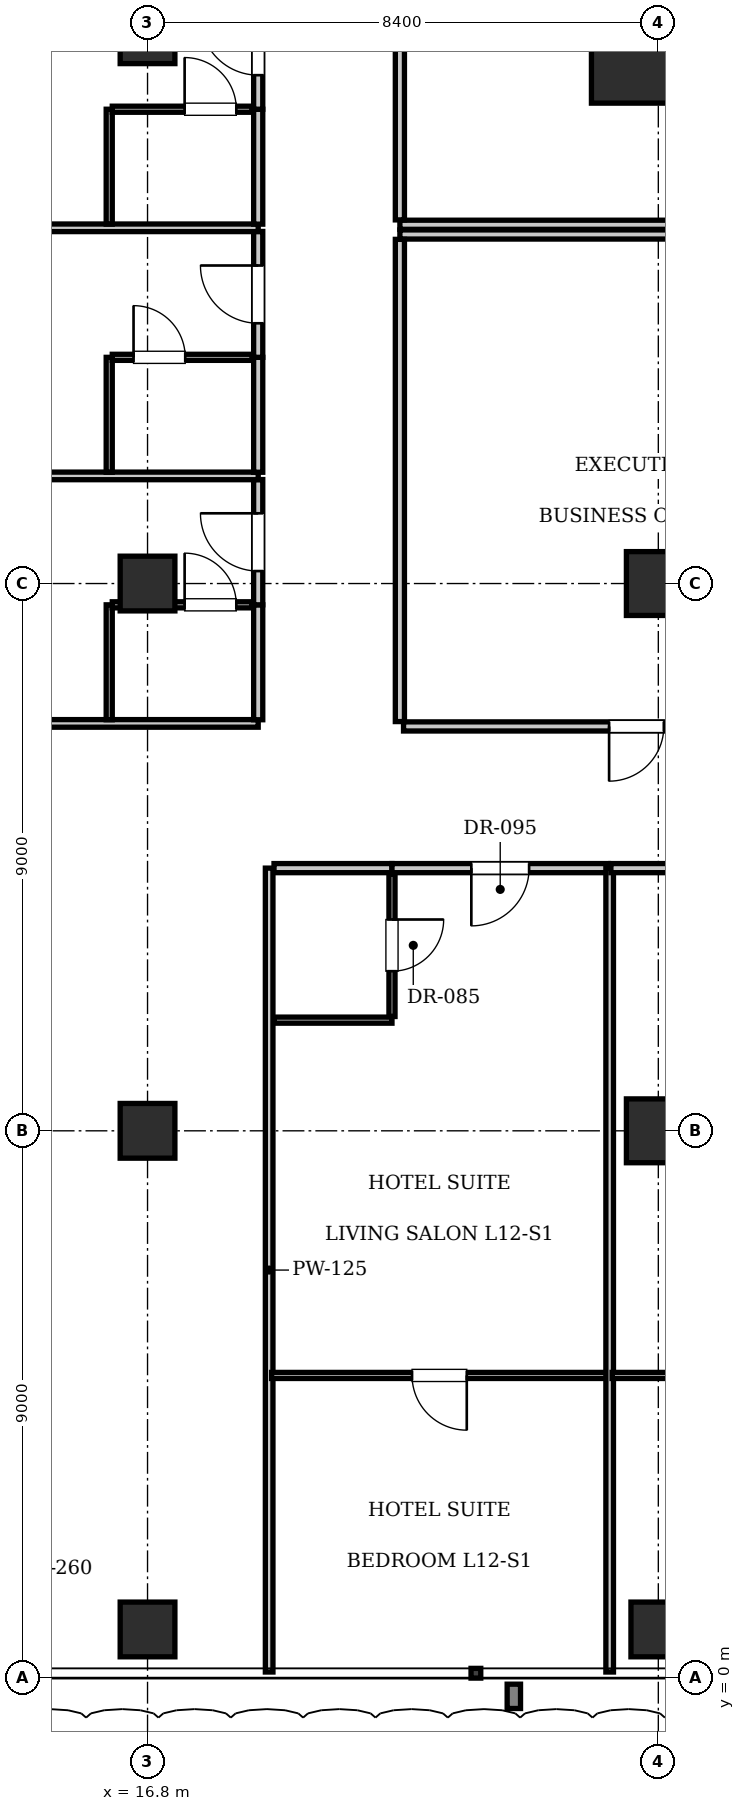
"""IFC4 building model, lengths in metres.
Left out: names, types, materials, properties, quantities, classifications, styles, units other than length and angle.
Written with IfcOpenShell. Run it as: python <this file> out.ifc"""

import sys

from ifc_helpers import new_model, si_unit, direction, frame, frame_2d, origin, origin_2d, place, context, subcontext, project, spatial, rectangle, extrude, element, fill, save


model = new_model("IFC4")
c1 = context("Model", 3, precision=1e-05, world=origin(), true_north=direction((0.0, 1.0)))
c2 = subcontext(c1, "Body", "Model", "MODEL_VIEW")
j1 = project(units=[si_unit("LENGTHUNIT", "METRE"), si_unit("PLANEANGLEUNIT", "RADIAN")], contexts=[c1])
p1 = place(None, origin())
s1 = spatial("IfcSite", under=j1, at=p1, CompositionType="ELEMENT")
p2 = place(p1, origin())
s2 = spatial("IfcBuilding", under=s1, at=p2, CompositionType="ELEMENT")
p3 = place(p2, frame((0.0, 0.0, 53.9)))
s3 = spatial("IfcBuildingStorey", under=s2, at=p3, CompositionType="ELEMENT", Elevation=53.9)
p4 = place(p3, frame((25.2, 27.0, 0.0), z_axis=(0.0, 0.0, 1.0), x_axis=(1.0, 0.0, 0.0)))
e1 = element("IfcColumn", 1, at=p4, inside=s3, PredefinedType="COLUMN", context=c2, shape_type="SweptSolid", body=[
    extrude(rectangle(XDim=2.2, YDim=2.2, at=origin_2d()), origin(), (0.0, 0.0, 1.0), 3.85),
])
for number, where, z_axis, x_axis in (
    (2, (25.2, 18.0, 0.0), (0.0, 0.0, 1.0), (1.0, 0.0, 0.0)),
    (3, (25.2, 9.0, 0.0), (0.0, 0.0, 1.0), (1.0, 0.0, 0.0)),
):
    element("IfcColumn", number, at=place(p3, frame(where, z_axis=z_axis, x_axis=x_axis)), inside=s3, PredefinedType="COLUMN", context=c2, shape_type="SweptSolid", body=[
        extrude(rectangle(XDim=1.05, YDim=1.05, at=origin_2d()), origin(), (0.0, 0.0, 1.0), 3.85),
    ])
for number, where, z_axis, x_axis in (
    (4, (16.8, 9.0, 0.0), (0.0, 0.0, 1.0), (1.0, 0.0, 0.0)),
    (5, (16.8, 18.0, 0.0), (0.0, 0.0, 1.0), (1.0, 0.0, 0.0)),
    (6, (16.8, 27.0, 0.0), (0.0, 0.0, 1.0), (1.0, 0.0, 0.0)),
    (7, (16.8, 0.8, 0.0), (0.0, 0.0, 1.0), (1.0, 0.0, 0.0)),
    (8, (25.2, 0.8, 0.0), (0.0, 0.0, 1.0), (1.0, 0.0, 0.0)),
):
    element("IfcColumn", number, at=place(p3, frame(where, z_axis=z_axis, x_axis=x_axis)), inside=s3, PredefinedType="COLUMN", context=c2, shape_type="SweptSolid", body=[
        extrude(rectangle(XDim=0.9, YDim=0.9, at=origin_2d()), origin(), (0.0, 0.0, 1.0), 3.85),
    ])
p5 = place(p3, frame((20.95, 23.9, 0.0), z_axis=(0.0, 0.0, 1.0), x_axis=(1.0, 0.0, 0.0)))
e9 = element("IfcWall", 9, at=p5, inside=s3, PredefinedType="PARTITIONING", context=c2, shape_type="SweptSolid", body=[
    extrude(rectangle(XDim=33.7, YDim=0.15, at=frame_2d((16.85, 0.0))), origin(), (0.0, 0.0, 1.0), 3.61),
])
p6 = place(p3, frame((20.95, 23.98, 0.0), z_axis=(0.0, 0.0, 1.0), x_axis=(0.0, 1.0, 0.0)))
e10 = element("IfcWall", 10, at=p6, inside=s3, PredefinedType="PARTITIONING", context=c2, shape_type="SweptSolid", body=[
    extrude(rectangle(XDim=7.94, YDim=0.15, at=frame_2d((3.97, 0.0))), origin(), (0.0, 0.0, 1.0), 3.207),
])
p7 = place(p3, frame((20.95, 23.74, 0.0), z_axis=(0.0, 0.0, 1.0), x_axis=(1.0, 0.0, 0.0)))
e11 = element("IfcWall", 11, at=p7, inside=s3, PredefinedType="PARTITIONING", context=c2, shape_type="SweptSolid", body=[
    extrude(rectangle(XDim=33.7, YDim=0.15, at=frame_2d((16.85, 0.0))), origin(), (0.0, 0.0, 1.0), 3.61),
])
p8 = place(p3, frame((20.95, 15.73, 0.0), z_axis=(0.0, 0.0, 1.0), x_axis=(0.0, 1.0, 0.0)))
e12 = element("IfcWall", 12, at=p8, inside=s3, PredefinedType="PARTITIONING", context=c2, shape_type="SweptSolid", body=[
    extrude(rectangle(XDim=7.93, YDim=0.15, at=frame_2d((3.965, 0.0))), origin(), (0.0, 0.0, 1.0), 3.207),
])
p9 = place(p3, frame((21.01, 15.65, 0.0), z_axis=(0.0, 0.0, 1.0), x_axis=(1.0, 0.0, 0.0)))
e13 = element("IfcWall", 13, at=p9, inside=s3, PredefinedType="PARTITIONING", context=c2, shape_type="SweptSolid", body=[
    extrude(rectangle(XDim=7.661, YDim=0.15, at=frame_2d((3.831, 0.0))), origin(), (0.0, 0.0, 1.0), 3.61),
])
p10 = place(p9, frame((3.381, 0.0, 0.0)))
e14 = element("IfcOpeningElement", 14, at=p10, cuts=e13, PredefinedType="OPENING", context=c2, shape_type="SweptSolid", body=[
    extrude(rectangle(XDim=0.9, YDim=2.1, at=frame_2d((0.45, 1.05))), frame((0.0, 0.085, 0.0), z_axis=(0.0, -1.0, 0.0), x_axis=(1.0, 0.0, 0.0)), (0.0, 0.0, 1.0), 0.17),
])
p11 = place(p3, frame((18.8, 0.1, 0.0), z_axis=(0.0, 0.0, 1.0), x_axis=(0.0, 1.0, 0.0)))
e15 = element("IfcWall", 15, at=p11, inside=s3, PredefinedType="PARTITIONING", context=c2, shape_type="SweptSolid", body=[
    extrude(rectangle(XDim=13.22, YDim=0.125, at=frame_2d((6.61, 0.0))), origin(), (0.0, 0.0, 1.0), 3.61),
])
p12 = place(p3, frame((18.88, 13.32, 0.0), z_axis=(0.0, 0.0, 1.0), x_axis=(1.0, 0.0, 0.0)))
e16 = element("IfcWall", 16, at=p12, inside=s3, PredefinedType="PARTITIONING", context=c2, shape_type="SweptSolid", body=[
    extrude(rectangle(XDim=1.94, YDim=0.15, at=frame_2d((0.97, 0.0))), origin(), (0.0, 0.0, 1.0), 3.61),
])
p13 = place(p3, frame((18.88, 10.82, 0.0), z_axis=(0.0, 0.0, 1.0), x_axis=(1.0, 0.0, 0.0)))
e17 = element("IfcWall", 17, at=p13, inside=s3, PredefinedType="PARTITIONING", context=c2, shape_type="SweptSolid", body=[
    extrude(rectangle(XDim=1.94, YDim=0.1, at=frame_2d((0.97, 0.0))), origin(), (0.0, 0.0, 1.0), 3.61),
])
p14 = place(p3, frame((20.82, 10.88, 0.0), z_axis=(0.0, 0.0, 1.0), x_axis=(0.0, 1.0, 0.0)))
e18 = element("IfcWall", 18, at=p14, inside=s3, PredefinedType="PARTITIONING", context=c2, shape_type="SweptSolid", body=[
    extrude(rectangle(XDim=2.34, YDim=0.1, at=frame_2d((1.17, 0.0))), origin(), (0.0, 0.0, 1.0), 3.61),
])
p15 = place(p14, frame((0.745, 0.0, 0.0)))
e19 = element("IfcOpeningElement", 19, at=p15, cuts=e18, PredefinedType="OPENING", context=c2, shape_type="SweptSolid", body=[
    extrude(rectangle(XDim=0.85, YDim=2.1, at=frame_2d((0.425, 1.05))), frame((0.0, 0.06, 0.0), z_axis=(0.0, -1.0, 0.0), x_axis=(1.0, 0.0, 0.0)), (0.0, 0.0, 1.0), 0.12),
])
p16 = place(p3, frame((20.82, 13.32, 0.0), z_axis=(0.0, 0.0, 1.0), x_axis=(1.0, 0.0, 0.0)))
e20 = element("IfcWall", 20, at=p16, inside=s3, PredefinedType="PARTITIONING", context=c2, shape_type="SweptSolid", body=[
    extrude(rectangle(XDim=3.56, YDim=0.15, at=frame_2d((1.78, 0.0))), origin(), (0.0, 0.0, 1.0), 3.61),
])
p17 = place(p16, frame((1.305, 0.0, 0.0)))
e21 = element("IfcOpeningElement", 21, at=p17, cuts=e20, PredefinedType="OPENING", context=c2, shape_type="SweptSolid", body=[
    extrude(rectangle(XDim=0.95, YDim=2.15, at=frame_2d((0.475, 1.075))), frame((0.0, 0.085, 0.0), z_axis=(0.0, -1.0, 0.0), x_axis=(1.0, 0.0, 0.0)), (0.0, 0.0, 1.0), 0.17),
])
p18 = place(p3, frame((18.84, 4.977, 0.0), z_axis=(0.0, 0.0, 1.0), x_axis=(1.0, 0.0, 0.0)))
e22 = element("IfcWall", 22, at=p18, inside=s3, PredefinedType="PARTITIONING", context=c2, shape_type="SweptSolid", body=[
    extrude(rectangle(XDim=5.52, YDim=0.1, at=frame_2d((2.76, 0.0))), origin(), (0.0, 0.0, 1.0), 3.61),
])
p19 = place(p18, frame((2.31, 0.0, 0.0)))
e23 = element("IfcOpeningElement", 23, at=p19, cuts=e22, PredefinedType="OPENING", context=c2, shape_type="SweptSolid", body=[
    extrude(rectangle(XDim=0.9, YDim=2.1, at=frame_2d((0.45, 1.05))), frame((0.0, 0.06, 0.0), z_axis=(0.0, -1.0, 0.0), x_axis=(1.0, 0.0, 0.0)), (0.0, 0.0, 1.0), 0.12),
])
p20 = place(p3, frame((24.4, 0.1, 0.0), z_axis=(0.0, 0.0, 1.0), x_axis=(0.0, 1.0, 0.0)))
e24 = element("IfcWall", 24, at=p20, inside=s3, PredefinedType="PARTITIONING", context=c2, shape_type="SweptSolid", body=[
    extrude(rectangle(XDim=13.22, YDim=0.125, at=frame_2d((6.61, 0.0))), origin(), (0.0, 0.0, 1.0), 3.61),
])
p21 = place(p3, frame((24.42, 13.32, 0.0), z_axis=(0.0, 0.0, 1.0), x_axis=(1.0, 0.0, 0.0)))
e25 = element("IfcWall", 25, at=p21, inside=s3, PredefinedType="PARTITIONING", context=c2, shape_type="SweptSolid", body=[
    extrude(rectangle(XDim=3.56, YDim=0.15, at=frame_2d((1.78, 0.0))), origin(), (0.0, 0.0, 1.0), 3.61),
])
p22 = place(p21, frame((1.305, 0.0, 0.0)))
e26 = element("IfcOpeningElement", 26, at=p22, cuts=e25, PredefinedType="OPENING", context=c2, shape_type="SweptSolid", body=[
    extrude(rectangle(XDim=0.95, YDim=2.15, at=frame_2d((0.475, 1.075))), frame((0.0, 0.085, 0.0), z_axis=(0.0, -1.0, 0.0), x_axis=(1.0, 0.0, 0.0)), (0.0, 0.0, 1.0), 0.17),
])
p23 = place(p3, frame((24.44, 4.977, 0.0), z_axis=(0.0, 0.0, 1.0), x_axis=(1.0, 0.0, 0.0)))
e27 = element("IfcWall", 27, at=p23, inside=s3, PredefinedType="PARTITIONING", context=c2, shape_type="SweptSolid", body=[
    extrude(rectangle(XDim=5.52, YDim=0.1, at=frame_2d((2.76, 0.0))), origin(), (0.0, 0.0, 1.0), 3.61),
])
p24 = place(p23, frame((2.31, 0.0, 0.0)))
e28 = element("IfcOpeningElement", 28, at=p24, cuts=e27, PredefinedType="OPENING", context=c2, shape_type="SweptSolid", body=[
    extrude(rectangle(XDim=0.9, YDim=2.1, at=frame_2d((0.45, 1.05))), frame((0.0, 0.06, 0.0), z_axis=(0.0, -1.0, 0.0), x_axis=(1.0, 0.0, 0.0)), (0.0, 0.0, 1.0), 0.12),
])
p25 = place(p3, frame((10.9, 15.7, 0.0), z_axis=(0.0, 0.0, 1.0), x_axis=(1.0, 0.0, 0.0)))
e29 = element("IfcWall", 29, at=p25, inside=s3, PredefinedType="PARTITIONING", context=c2, shape_type="SweptSolid", body=[
    extrude(rectangle(XDim=7.72, YDim=0.125, at=frame_2d((3.86, 0.0))), origin(), (0.0, 0.0, 1.0), 3.61),
])
p26 = place(p3, frame((18.62, 15.76, 0.0), z_axis=(0.0, 0.0, 1.0), x_axis=(0.0, 1.0, 0.0)))
e30 = element("IfcWall", 30, at=p26, inside=s3, PredefinedType="PARTITIONING", context=c2, shape_type="SweptSolid", body=[
    extrude(rectangle(XDim=1.89, YDim=0.15, at=frame_2d((0.945, 0.0))), origin(), (0.0, 0.0, 1.0), 3.61),
])
p27 = place(p3, frame((18.62, 17.65, 0.0), z_axis=(0.0, 0.0, 1.0), x_axis=(0.0, 1.0, 0.0)))
e31 = element("IfcWall", 31, at=p27, inside=s3, PredefinedType="PARTITIONING", context=c2, shape_type="SweptSolid", body=[
    extrude(rectangle(XDim=2.06, YDim=0.15, at=frame_2d((1.03, 0.0))), origin(), (0.0, 0.0, 1.0), 3.61),
])
p28 = place(p27, frame((0.555, 0.0, 0.0)))
e32 = element("IfcOpeningElement", 32, at=p28, cuts=e31, PredefinedType="OPENING", context=c2, shape_type="SweptSolid", body=[
    extrude(rectangle(XDim=0.95, YDim=2.15, at=frame_2d((0.475, 1.075))), frame((0.0, 0.085, 0.0), z_axis=(0.0, -1.0, 0.0), x_axis=(1.0, 0.0, 0.0)), (0.0, 0.0, 1.0), 0.17),
])
p29 = place(p3, frame((16.17, 15.76, 0.0), z_axis=(0.0, 0.0, 1.0), x_axis=(0.0, 1.0, 0.0)))
e33 = element("IfcWall", 33, at=p29, inside=s3, PredefinedType="PARTITIONING", context=c2, shape_type="SweptSolid", body=[
    extrude(rectangle(XDim=1.89, YDim=0.1, at=frame_2d((0.945, 0.0))), origin(), (0.0, 0.0, 1.0), 3.61),
])
p30 = place(p3, frame((16.22, 17.65, 0.0), z_axis=(0.0, 0.0, 1.0), x_axis=(1.0, 0.0, 0.0)))
e34 = element("IfcWall", 34, at=p30, inside=s3, PredefinedType="PARTITIONING", context=c2, shape_type="SweptSolid", body=[
    extrude(rectangle(XDim=2.3, YDim=0.1, at=frame_2d((1.15, 0.0))), origin(), (0.0, 0.0, 1.0), 3.61),
])
p31 = place(p30, frame((1.19, 0.0, 0.0)))
e35 = element("IfcOpeningElement", 35, at=p31, cuts=e34, PredefinedType="OPENING", context=c2, shape_type="SweptSolid", body=[
    extrude(rectangle(XDim=0.85, YDim=2.1, at=frame_2d((0.425, 1.05))), frame((0.0, 0.06, 0.0), z_axis=(0.0, -1.0, 0.0), x_axis=(1.0, 0.0, 0.0)), (0.0, 0.0, 1.0), 0.12),
])
p32 = place(p3, frame((10.9, 19.77, 0.0), z_axis=(0.0, 0.0, 1.0), x_axis=(1.0, 0.0, 0.0)))
e36 = element("IfcWall", 36, at=p32, inside=s3, PredefinedType="PARTITIONING", context=c2, shape_type="SweptSolid", body=[
    extrude(rectangle(XDim=7.72, YDim=0.125, at=frame_2d((3.86, 0.0))), origin(), (0.0, 0.0, 1.0), 3.61),
])
p33 = place(p3, frame((18.62, 19.83, 0.0), z_axis=(0.0, 0.0, 1.0), x_axis=(0.0, 1.0, 0.0)))
e37 = element("IfcWall", 37, at=p33, inside=s3, PredefinedType="PARTITIONING", context=c2, shape_type="SweptSolid", body=[
    extrude(rectangle(XDim=1.89, YDim=0.15, at=frame_2d((0.945, 0.0))), origin(), (0.0, 0.0, 1.0), 3.61),
])
p34 = place(p3, frame((18.62, 21.72, 0.0), z_axis=(0.0, 0.0, 1.0), x_axis=(0.0, 1.0, 0.0)))
e38 = element("IfcWall", 38, at=p34, inside=s3, PredefinedType="PARTITIONING", context=c2, shape_type="SweptSolid", body=[
    extrude(rectangle(XDim=2.07, YDim=0.15, at=frame_2d((1.035, 0.0))), origin(), (0.0, 0.0, 1.0), 3.61),
])
p35 = place(p34, frame((0.56, 0.0, 0.0)))
e39 = element("IfcOpeningElement", 39, at=p35, cuts=e38, PredefinedType="OPENING", context=c2, shape_type="SweptSolid", body=[
    extrude(rectangle(XDim=0.95, YDim=2.15, at=frame_2d((0.475, 1.075))), frame((0.0, 0.085, 0.0), z_axis=(0.0, -1.0, 0.0), x_axis=(1.0, 0.0, 0.0)), (0.0, 0.0, 1.0), 0.17),
])
p36 = place(p3, frame((16.17, 19.83, 0.0), z_axis=(0.0, 0.0, 1.0), x_axis=(0.0, 1.0, 0.0)))
e40 = element("IfcWall", 40, at=p36, inside=s3, PredefinedType="PARTITIONING", context=c2, shape_type="SweptSolid", body=[
    extrude(rectangle(XDim=1.89, YDim=0.1, at=frame_2d((0.945, 0.0))), origin(), (0.0, 0.0, 1.0), 3.61),
])
p37 = place(p3, frame((16.22, 21.72, 0.0), z_axis=(0.0, 0.0, 1.0), x_axis=(1.0, 0.0, 0.0)))
e41 = element("IfcWall", 41, at=p37, inside=s3, PredefinedType="PARTITIONING", context=c2, shape_type="SweptSolid", body=[
    extrude(rectangle(XDim=2.3, YDim=0.1, at=frame_2d((1.15, 0.0))), origin(), (0.0, 0.0, 1.0), 3.61),
])
p38 = place(p37, frame((0.35, 0.0, 0.0)))
e42 = element("IfcOpeningElement", 42, at=p38, cuts=e41, PredefinedType="OPENING", context=c2, shape_type="SweptSolid", body=[
    extrude(rectangle(XDim=0.85, YDim=2.1, at=frame_2d((0.425, 1.05))), frame((0.0, 0.06, 0.0), z_axis=(0.0, -1.0, 0.0), x_axis=(1.0, 0.0, 0.0)), (0.0, 0.0, 1.0), 0.12),
])
p39 = place(p3, frame((10.9, 23.85, 0.0), z_axis=(0.0, 0.0, 1.0), x_axis=(1.0, 0.0, 0.0)))
e43 = element("IfcWall", 43, at=p39, inside=s3, PredefinedType="PARTITIONING", context=c2, shape_type="SweptSolid", body=[
    extrude(rectangle(XDim=7.72, YDim=0.125, at=frame_2d((3.86, 0.0))), origin(), (0.0, 0.0, 1.0), 3.61),
])
p40 = place(p3, frame((18.62, 23.91, 0.0), z_axis=(0.0, 0.0, 1.0), x_axis=(0.0, 1.0, 0.0)))
e44 = element("IfcWall", 44, at=p40, inside=s3, PredefinedType="PARTITIONING", context=c2, shape_type="SweptSolid", body=[
    extrude(rectangle(XDim=1.89, YDim=0.15, at=frame_2d((0.945, 0.0))), origin(), (0.0, 0.0, 1.0), 3.61),
])
p41 = place(p3, frame((18.62, 25.8, 0.0), z_axis=(0.0, 0.0, 1.0), x_axis=(0.0, 1.0, 0.0)))
e45 = element("IfcWall", 45, at=p41, inside=s3, PredefinedType="PARTITIONING", context=c2, shape_type="SweptSolid", body=[
    extrude(rectangle(XDim=2.07, YDim=0.15, at=frame_2d((1.035, 0.0))), origin(), (0.0, 0.0, 1.0), 3.61),
])
p42 = place(p41, frame((0.56, 0.0, 0.0)))
e46 = element("IfcOpeningElement", 46, at=p42, cuts=e45, PredefinedType="OPENING", context=c2, shape_type="SweptSolid", body=[
    extrude(rectangle(XDim=0.95, YDim=2.15, at=frame_2d((0.475, 1.075))), frame((0.0, 0.085, 0.0), z_axis=(0.0, -1.0, 0.0), x_axis=(1.0, 0.0, 0.0)), (0.0, 0.0, 1.0), 0.17),
])
p43 = place(p3, frame((16.17, 23.91, 0.0), z_axis=(0.0, 0.0, 1.0), x_axis=(0.0, 1.0, 0.0)))
e47 = element("IfcWall", 47, at=p43, inside=s3, PredefinedType="PARTITIONING", context=c2, shape_type="SweptSolid", body=[
    extrude(rectangle(XDim=1.89, YDim=0.1, at=frame_2d((0.945, 0.0))), origin(), (0.0, 0.0, 1.0), 3.61),
])
p44 = place(p3, frame((16.22, 25.8, 0.0), z_axis=(0.0, 0.0, 1.0), x_axis=(1.0, 0.0, 0.0)))
e48 = element("IfcWall", 48, at=p44, inside=s3, PredefinedType="PARTITIONING", context=c2, shape_type="SweptSolid", body=[
    extrude(rectangle(XDim=2.3, YDim=0.1, at=frame_2d((1.15, 0.0))), origin(), (0.0, 0.0, 1.0), 3.61),
])
p45 = place(p44, frame((1.19, 0.0, 0.0)))
e49 = element("IfcOpeningElement", 49, at=p45, cuts=e48, PredefinedType="OPENING", context=c2, shape_type="SweptSolid", body=[
    extrude(rectangle(XDim=0.85, YDim=2.1, at=frame_2d((0.425, 1.05))), frame((0.0, 0.06, 0.0), z_axis=(0.0, -1.0, 0.0), x_axis=(1.0, 0.0, 0.0)), (0.0, 0.0, 1.0), 0.12),
])
p46 = place(p10, frame((0.9, 0.0, 0.0), z_axis=(0.0, 0.0, 1.0), x_axis=(-1.0, 0.0, 0.0)))
e50 = element("IfcDoor", 50, at=p46, inside=s3, OperationType="SINGLE_SWING_RIGHT", PredefinedType="DOOR", context=c2, shape_type="SweptSolid", body=[
    extrude(rectangle(XDim=0.9, YDim=2.1, at=frame_2d((0.45, 1.05))), frame((0.0, 0.025, 0.0), z_axis=(0.0, -1.0, 0.0), x_axis=(1.0, 0.0, 0.0)), (0.0, 0.0, 1.0), 0.05),
])
fill(e14, e50)
p47 = place(p15, frame((0.85, 0.0, 0.0), z_axis=(0.0, 0.0, 1.0), x_axis=(-1.0, 0.0, 0.0)))
e51 = element("IfcDoor", 51, at=p47, inside=s3, OperationType="SINGLE_SWING_LEFT", PredefinedType="DOOR", context=c2, shape_type="SweptSolid", body=[
    extrude(rectangle(XDim=0.85, YDim=2.1, at=frame_2d((0.425, 1.05))), frame((0.0, 0.025, 0.0), z_axis=(0.0, -1.0, 0.0), x_axis=(1.0, 0.0, 0.0)), (0.0, 0.0, 1.0), 0.05),
])
fill(e19, e51)
p48 = place(p17, frame((0.95, 0.0, 0.0), z_axis=(0.0, 0.0, 1.0), x_axis=(-1.0, 0.0, 0.0)))
e52 = element("IfcDoor", 52, at=p48, inside=s3, OperationType="SINGLE_SWING_RIGHT", PredefinedType="DOOR", context=c2, shape_type="SweptSolid", body=[
    extrude(rectangle(XDim=0.95, YDim=2.15, at=frame_2d((0.475, 1.075))), frame((0.0, 0.025, 0.0), z_axis=(0.0, -1.0, 0.0), x_axis=(1.0, 0.0, 0.0)), (0.0, 0.0, 1.0), 0.05),
])
fill(e21, e52)
p49 = place(p19, frame((0.9, 0.0, 0.0), z_axis=(0.0, 0.0, 1.0), x_axis=(-1.0, 0.0, 0.0)))
e53 = element("IfcDoor", 53, at=p49, inside=s3, OperationType="SINGLE_SWING_LEFT", PredefinedType="DOOR", context=c2, shape_type="SweptSolid", body=[
    extrude(rectangle(XDim=0.9, YDim=2.1, at=frame_2d((0.45, 1.05))), frame((0.0, 0.025, 0.0), z_axis=(0.0, -1.0, 0.0), x_axis=(1.0, 0.0, 0.0)), (0.0, 0.0, 1.0), 0.05),
])
fill(e23, e53)
p50 = place(p31, origin())
e54 = element("IfcDoor", 54, at=p50, inside=s3, OperationType="SINGLE_SWING_LEFT", PredefinedType="DOOR", context=c2, shape_type="SweptSolid", body=[
    extrude(rectangle(XDim=0.85, YDim=2.1, at=frame_2d((0.425, 1.05))), frame((0.0, 0.025, 0.0), z_axis=(0.0, -1.0, 0.0), x_axis=(1.0, 0.0, 0.0)), (0.0, 0.0, 1.0), 0.05),
])
fill(e35, e54)
p51 = place(p28, origin())
e55 = element("IfcDoor", 55, at=p51, inside=s3, OperationType="SINGLE_SWING_RIGHT", PredefinedType="DOOR", context=c2, shape_type="SweptSolid", body=[
    extrude(rectangle(XDim=0.95, YDim=2.15, at=frame_2d((0.475, 1.075))), frame((0.0, 0.025, 0.0), z_axis=(0.0, -1.0, 0.0), x_axis=(1.0, 0.0, 0.0)), (0.0, 0.0, 1.0), 0.05),
])
fill(e32, e55)
p52 = place(p38, origin())
e56 = element("IfcDoor", 56, at=p52, inside=s3, OperationType="SINGLE_SWING_LEFT", PredefinedType="DOOR", context=c2, shape_type="SweptSolid", body=[
    extrude(rectangle(XDim=0.85, YDim=2.1, at=frame_2d((0.425, 1.05))), frame((0.0, 0.025, 0.0), z_axis=(0.0, -1.0, 0.0), x_axis=(1.0, 0.0, 0.0)), (0.0, 0.0, 1.0), 0.05),
])
fill(e42, e56)
p53 = place(p35, origin())
e57 = element("IfcDoor", 57, at=p53, inside=s3, OperationType="SINGLE_SWING_RIGHT", PredefinedType="DOOR", context=c2, shape_type="SweptSolid", body=[
    extrude(rectangle(XDim=0.95, YDim=2.15, at=frame_2d((0.475, 1.075))), frame((0.0, 0.025, 0.0), z_axis=(0.0, -1.0, 0.0), x_axis=(1.0, 0.0, 0.0)), (0.0, 0.0, 1.0), 0.05),
])
fill(e39, e57)
p54 = place(p45, origin())
e58 = element("IfcDoor", 58, at=p54, inside=s3, OperationType="SINGLE_SWING_LEFT", PredefinedType="DOOR", context=c2, shape_type="SweptSolid", body=[
    extrude(rectangle(XDim=0.85, YDim=2.1, at=frame_2d((0.425, 1.05))), frame((0.0, 0.025, 0.0), z_axis=(0.0, -1.0, 0.0), x_axis=(1.0, 0.0, 0.0)), (0.0, 0.0, 1.0), 0.05),
])
fill(e49, e58)
p55 = place(p42, origin())
e59 = element("IfcDoor", 59, at=p55, inside=s3, OperationType="SINGLE_SWING_RIGHT", PredefinedType="DOOR", context=c2, shape_type="SweptSolid", body=[
    extrude(rectangle(XDim=0.95, YDim=2.15, at=frame_2d((0.475, 1.075))), frame((0.0, 0.025, 0.0), z_axis=(0.0, -1.0, 0.0), x_axis=(1.0, 0.0, 0.0)), (0.0, 0.0, 1.0), 0.05),
])
fill(e46, e59)
save(model, sys.argv[1])
